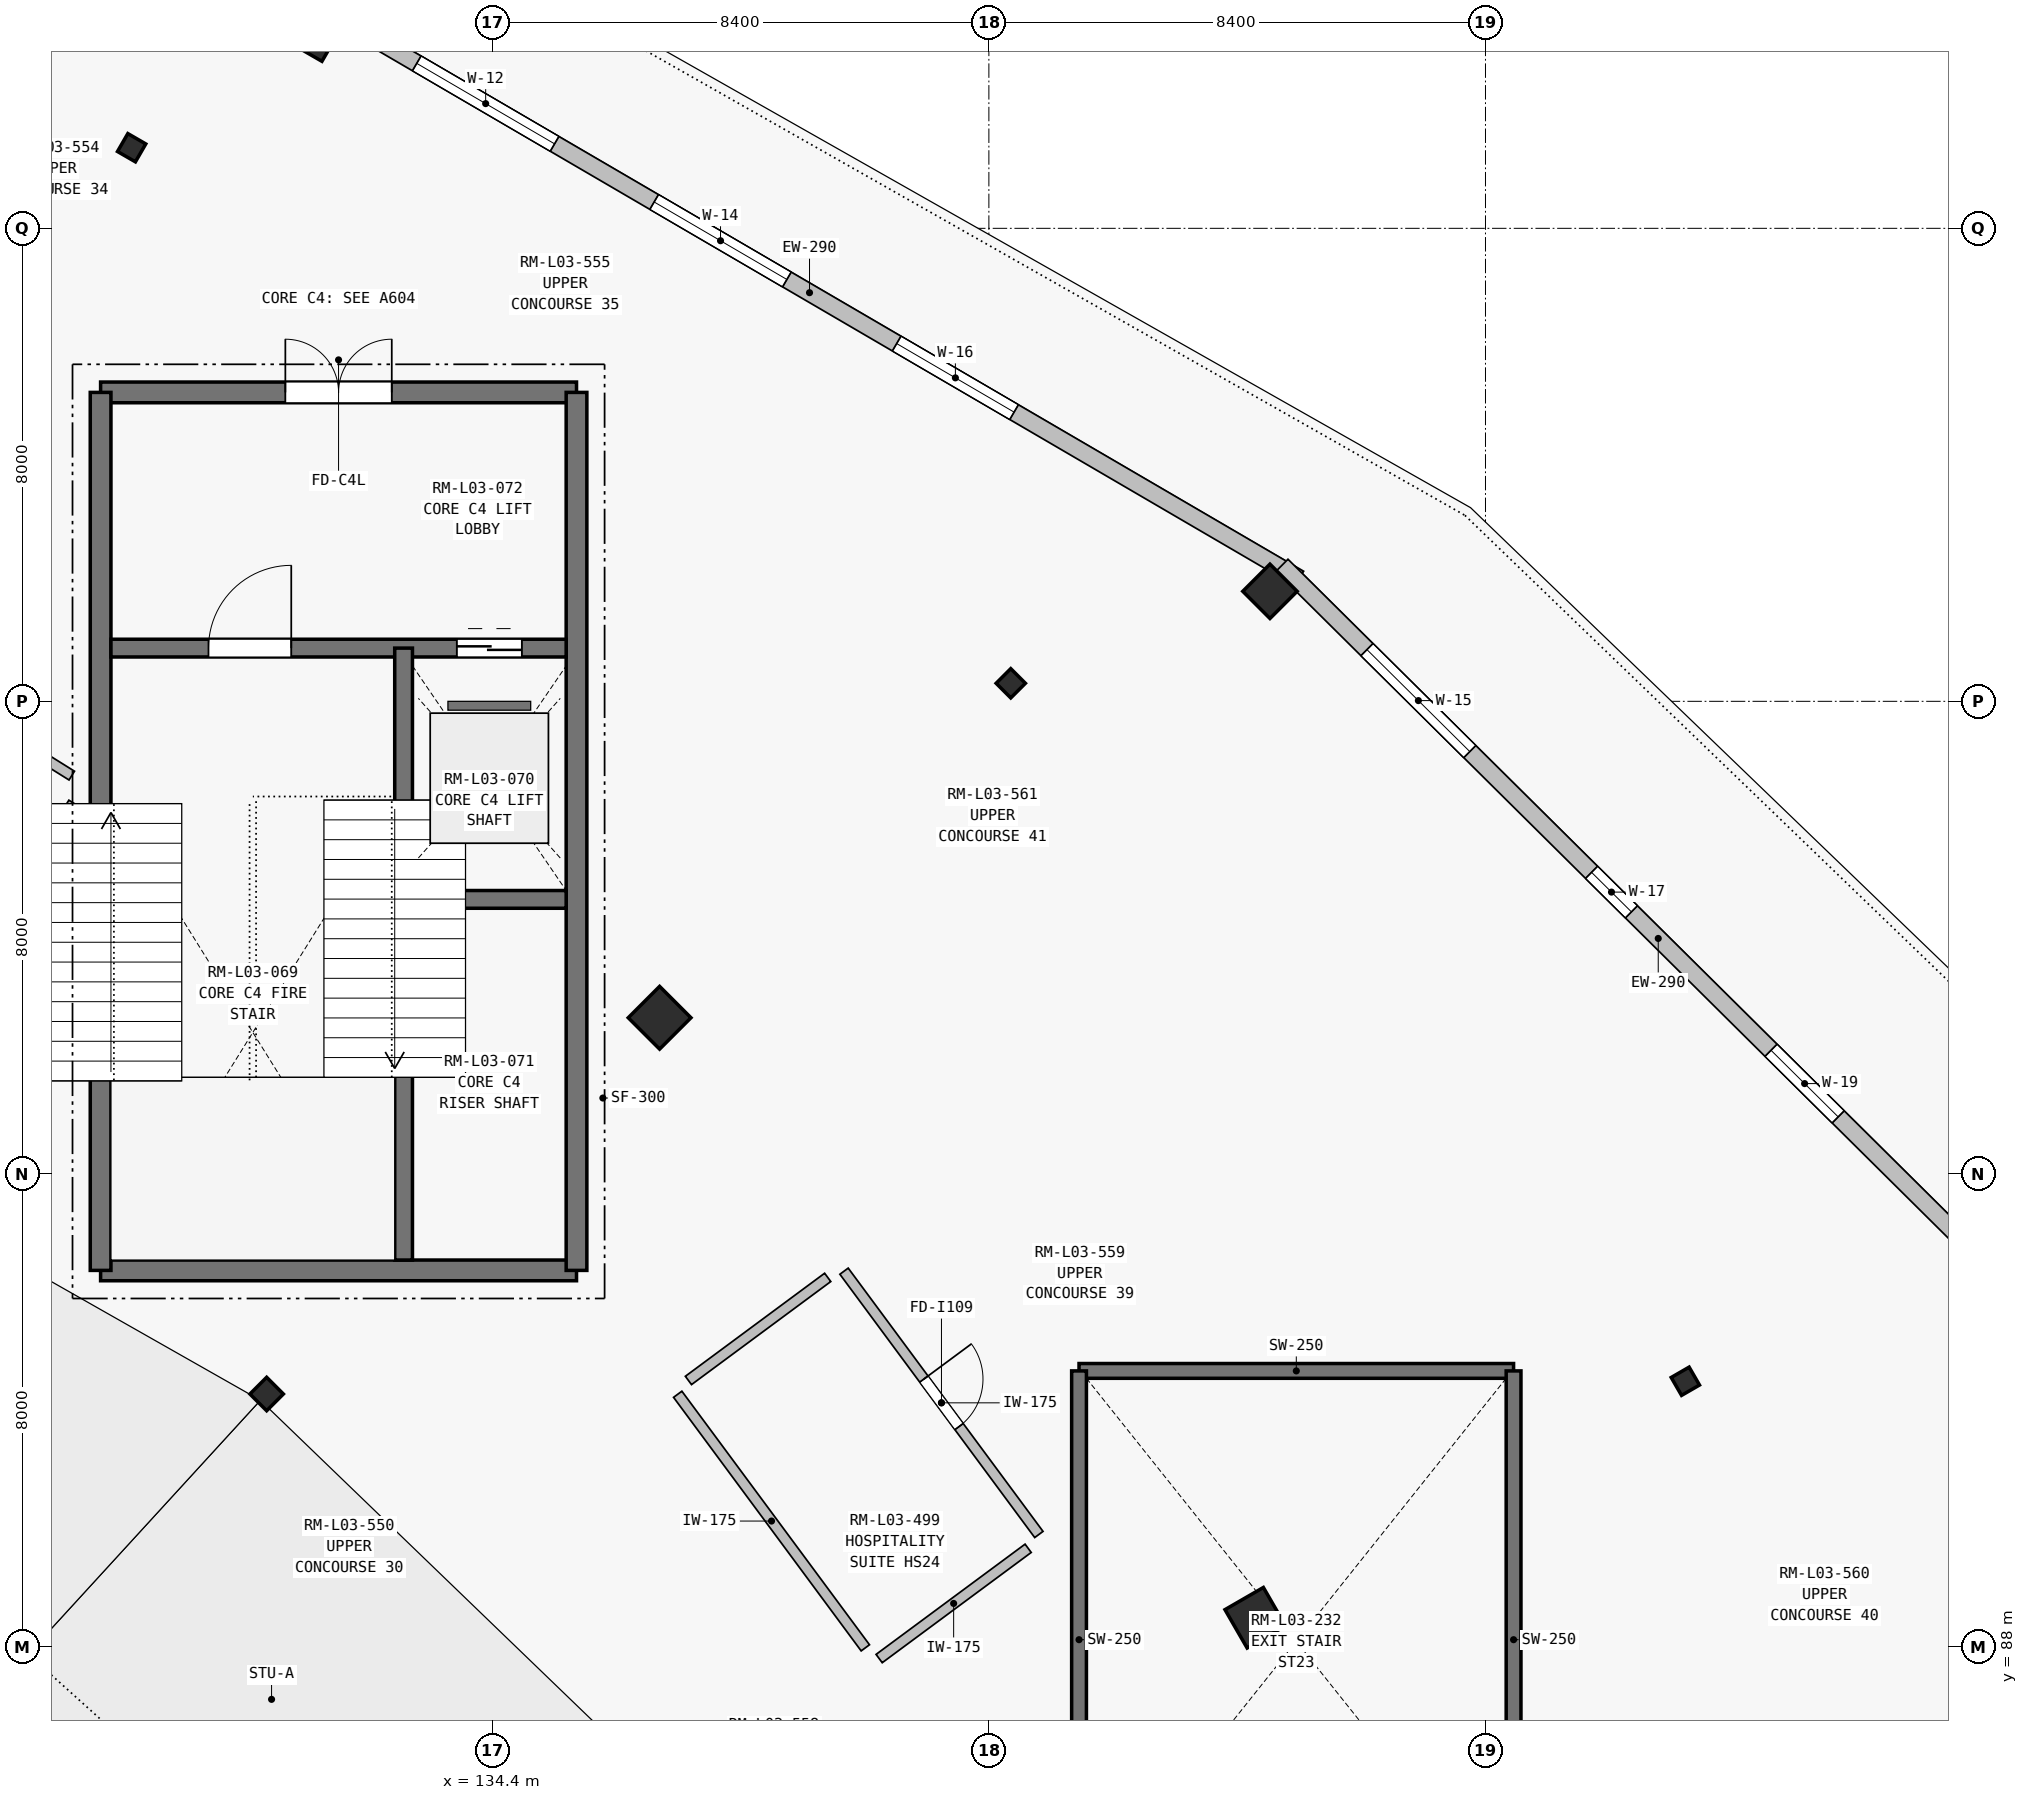
"""IFC4 building model, lengths in metres.
Left out: names, types, materials, properties, quantities, classifications, styles, units other than length and angle.
Written with IfcOpenShell. Run it as: python <this file> out.ifc"""

import sys

from ifc_helpers import new_model, si_unit, direction, frame, frame_2d, origin, origin_2d, place, context, subcontext, project, spatial, rectangle, i_section, extrude, element, fill, save


model = new_model("IFC4")
c1 = context("Model", 3, precision=1e-05, world=origin(), true_north=direction((0.0, 1.0)))
c2 = subcontext(c1, "Body", "Model", "MODEL_VIEW")
j1 = project(units=[si_unit("LENGTHUNIT", "METRE"), si_unit("PLANEANGLEUNIT", "RADIAN")], contexts=[c1])
p1 = place(None, origin())
s1 = spatial("IfcSite", under=j1, at=p1, CompositionType="ELEMENT")
p2 = place(p1, origin())
s2 = spatial("IfcBuilding", under=s1, at=p2, CompositionType="ELEMENT")
p3 = place(p2, frame((0.0, 0.0, 14.4)))
s3 = spatial("IfcBuildingStorey", under=s2, at=p3, CompositionType="ELEMENT", Elevation=14.4)
p4 = place(p3, frame((130.584, 92.284, 0.0), z_axis=(0.0, 0.0, 1.0), x_axis=(0.707106781187, 0.707106781187, 0.0)))
e1 = element("IfcColumn", 1, at=p4, inside=s3, PredefinedType="COLUMN", context=c2, shape_type="SweptSolid", body=[
    extrude(i_section(OverallWidth=0.4, OverallDepth=0.4, WebThickness=0.016, FlangeThickness=0.028, at=origin_2d()), origin(), (0.0, 0.0, 1.0), 4.5),
])
for number, where, z_axis, x_axis in (
    (2, (147.306, 88.5, 0.0), (0.0, 0.0, 1.0), (0.866, 0.5, 0.0)),
    (3, (137.231, 98.648, 0.0), (0.0, 0.0, 1.0), (0.707, 0.707, 0.0)),
):
    element("IfcColumn", number, at=place(p3, frame(where, z_axis=z_axis, x_axis=x_axis)), inside=s3, PredefinedType="COLUMN", context=c2, shape_type="SweptSolid", body=[
        extrude(rectangle(XDim=0.75, YDim=0.75, at=origin_2d()), origin(), (0.0, 0.0, 1.0), 4.5),
    ])
for number, where, z_axis, x_axis in (
    (4, (154.581, 92.5, 0.0), (0.0, 0.0, 1.0), (0.866, 0.5, 0.0)),
    (5, (143.17, 104.305, 0.0), (0.0, 0.0, 1.0), (0.707, 0.707, 0.0)),
    (6, (128.3, 113.363, 0.0), (0.0, 0.0, 1.0), (0.5, 0.866, 0.0)),
):
    element("IfcColumn", number, at=place(p3, frame(where, z_axis=z_axis, x_axis=x_axis)), inside=s3, PredefinedType="COLUMN", context=c2, shape_type="SweptSolid", body=[
        extrude(i_section(OverallWidth=0.35, OverallDepth=0.35, WebThickness=0.014, FlangeThickness=0.024, at=origin_2d()), origin(), (0.0, 0.0, 1.0), 4.5),
    ])
for number, where, z_axis, x_axis in (
    (7, (147.554, 105.861, 0.0), (0.0, 0.0, 1.0), (0.707, 0.707, 0.0)),
    (8, (131.4, 115.269, 0.0), (0.0, 0.0, 1.0), (0.5, 0.866, 0.0)),
):
    element("IfcColumn", number, at=place(p3, frame(where, z_axis=z_axis, x_axis=x_axis)), inside=s3, PredefinedType="COLUMN", context=c2, shape_type="SweptSolid", body=[
        extrude(rectangle(XDim=0.65, YDim=0.65, at=origin_2d()), origin(), (0.0, 0.0, 1.0), 4.26),
    ])
p5 = place(p3, frame((131.482, 115.748, 0.0), z_axis=(0.0, 0.0, 1.0), x_axis=(0.863607623942, -0.504164528572, 0.0)))
e9 = element("IfcWall", 9, at=p5, inside=s3, PredefinedType="SOLIDWALL", context=c2, shape_type="SweptSolid", body=[
    extrude(rectangle(XDim=19.186, YDim=0.29, at=frame_2d((9.593, 0.0))), origin(), (0.0, 0.0, 1.0), 4.26),
])
p6 = place(p5, frame((1.9, 0.0, 0.9)))
e10 = element("IfcOpeningElement", 10, at=p6, cuts=e9, PredefinedType="OPENING", context=c2, shape_type="SweptSolid", body=[
    extrude(rectangle(XDim=2.7, YDim=1.55, at=frame_2d((1.35, 0.775))), frame((0.0, 0.155, 0.0), z_axis=(0.0, -1.0, 0.0), x_axis=(1.0, 0.0, 0.0)), (0.0, 0.0, 1.0), 0.31),
])
p7 = place(p5, frame((6.55, 0.0, 0.9)))
e11 = element("IfcOpeningElement", 11, at=p7, cuts=e9, PredefinedType="OPENING", context=c2, shape_type="SweptSolid", body=[
    extrude(rectangle(XDim=2.6, YDim=1.4, at=frame_2d((1.3, 0.7))), frame((0.0, 0.155, 0.0), z_axis=(0.0, -1.0, 0.0), x_axis=(1.0, 0.0, 0.0)), (0.0, 0.0, 1.0), 0.31),
])
p8 = place(p5, frame((11.3, 0.0, 0.9)))
e12 = element("IfcOpeningElement", 12, at=p8, cuts=e9, PredefinedType="OPENING", context=c2, shape_type="SweptSolid", body=[
    extrude(rectangle(XDim=2.3, YDim=1.3, at=frame_2d((1.15, 0.65))), frame((0.0, 0.155, 0.0), z_axis=(0.0, -1.0, 0.0), x_axis=(1.0, 0.0, 0.0)), (0.0, 0.0, 1.0), 0.31),
])
p9 = place(p3, frame((147.757, 106.301, 0.0), z_axis=(0.0, 0.0, 1.0), x_axis=(0.710110182589, -0.704090568452, 0.0)))
e13 = element("IfcWall", 13, at=p9, inside=s3, PredefinedType="SOLIDWALL", context=c2, shape_type="SweptSolid", body=[
    extrude(rectangle(XDim=17.927, YDim=0.29, at=frame_2d((8.963, 0.0))), origin(), (0.0, 0.0, 1.0), 4.26),
])
p10 = place(p9, frame((2.025, 0.0, 0.9)))
e14 = element("IfcOpeningElement", 14, at=p10, cuts=e13, PredefinedType="OPENING", context=c2, shape_type="SweptSolid", body=[
    extrude(rectangle(XDim=2.45, YDim=1.35, at=frame_2d((1.225, 0.675))), frame((0.0, 0.155, 0.0), z_axis=(0.0, -1.0, 0.0), x_axis=(1.0, 0.0, 0.0)), (0.0, 0.0, 1.0), 0.31),
])
p11 = place(p9, frame((7.375, 0.0, 0.75)))
e15 = element("IfcOpeningElement", 15, at=p11, cuts=e13, PredefinedType="OPENING", context=c2, shape_type="SweptSolid", body=[
    extrude(rectangle(XDim=0.95, YDim=2.2, at=frame_2d((0.475, 1.1))), frame((0.0, 0.155, 0.0), z_axis=(0.0, -1.0, 0.0), x_axis=(1.0, 0.0, 0.0)), (0.0, 0.0, 1.0), 0.31),
])
p12 = place(p9, frame((11.65, 0.0, 0.9)))
e16 = element("IfcOpeningElement", 16, at=p12, cuts=e13, PredefinedType="OPENING", context=c2, shape_type="SweptSolid", body=[
    extrude(rectangle(XDim=1.6, YDim=1.45, at=frame_2d((0.8, 0.725))), frame((0.0, 0.155, 0.0), z_axis=(0.0, -1.0, 0.0), x_axis=(1.0, 0.0, 0.0)), (0.0, 0.0, 1.0), 0.31),
])
p13 = place(p3, frame((127.775, 94.375, 0.0), z_axis=(0.0, 0.0, 1.0), x_axis=(1.0, 0.0, 0.0)))
e17 = element("IfcWall", 17, at=p13, inside=s3, PredefinedType="SHEAR", context=c2, shape_type="SweptSolid", body=[
    extrude(rectangle(XDim=8.05, YDim=0.35, at=frame_2d((4.025, 0.0))), origin(), (0.0, 0.0, 1.0), 4.5),
])
p14 = place(p3, frame((127.775, 109.225, 0.0), z_axis=(0.0, 0.0, 1.0), x_axis=(1.0, 0.0, 0.0)))
e18 = element("IfcWall", 18, at=p14, inside=s3, PredefinedType="SHEAR", context=c2, shape_type="SweptSolid", body=[
    extrude(rectangle(XDim=8.05, YDim=0.35, at=frame_2d((4.025, 0.0))), origin(), (0.0, 0.0, 1.0), 4.5),
])
p15 = place(p14, frame((3.125, 0.0, 0.0)))
e19 = element("IfcOpeningElement", 19, at=p15, cuts=e18, PredefinedType="OPENING", context=c2, shape_type="SweptSolid", body=[
    extrude(rectangle(XDim=1.8, YDim=2.25, at=frame_2d((0.9, 1.125))), frame((0.0, 0.185, 0.0), z_axis=(0.0, -1.0, 0.0), x_axis=(1.0, 0.0, 0.0)), (0.0, 0.0, 1.0), 0.37),
])
for number, where, z_axis, x_axis in (
    (20, (127.775, 94.375, 0.0), (0.0, 0.0, 1.0), (0.0, 1.0, 0.0)),
    (21, (135.825, 94.375, 0.0), (0.0, 0.0, 1.0), (0.0, 1.0, 0.0)),
):
    element("IfcWall", number, at=place(p3, frame(where, z_axis=z_axis, x_axis=x_axis)), inside=s3, PredefinedType="SHEAR", context=c2, shape_type="SweptSolid", body=[
        extrude(rectangle(XDim=14.85, YDim=0.35, at=frame_2d((7.425, 0.0))), origin(), (0.0, 0.0, 1.0), 4.5),
    ])
p16 = place(p3, frame((127.95, 104.9, 0.0), z_axis=(0.0, 0.0, 1.0), x_axis=(1.0, 0.0, 0.0)))
e22 = element("IfcWall", 22, at=p16, inside=s3, PredefinedType="SHEAR", context=c2, shape_type="SweptSolid", body=[
    extrude(rectangle(XDim=7.7, YDim=0.3, at=frame_2d((3.85, 0.0))), origin(), (0.0, 0.0, 1.0), 4.5),
])
p17 = place(p16, frame((1.65, 0.0, 0.0)))
e23 = element("IfcOpeningElement", 23, at=p17, cuts=e22, PredefinedType="OPENING", context=c2, shape_type="SweptSolid", body=[
    extrude(rectangle(XDim=1.4, YDim=2.2, at=frame_2d((0.7, 1.1))), frame((0.0, 0.16, 0.0), z_axis=(0.0, -1.0, 0.0), x_axis=(1.0, 0.0, 0.0)), (0.0, 0.0, 1.0), 0.32),
])
p18 = place(p16, frame((5.85, 0.0, 0.0)))
e24 = element("IfcOpeningElement", 24, at=p18, cuts=e22, PredefinedType="OPENING", context=c2, shape_type="SweptSolid", body=[
    extrude(rectangle(XDim=1.1, YDim=2.2, at=frame_2d((0.55, 1.1))), frame((0.0, 0.16, 0.0), z_axis=(0.0, -1.0, 0.0), x_axis=(1.0, 0.0, 0.0)), (0.0, 0.0, 1.0), 0.32),
])
p19 = place(p3, frame((132.9, 94.55, 0.0), z_axis=(0.0, 0.0, 1.0), x_axis=(0.0, 1.0, 0.0)))
e25 = element("IfcWall", 25, at=p19, inside=s3, PredefinedType="SHEAR", context=c2, shape_type="SweptSolid", body=[
    extrude(rectangle(XDim=10.35, YDim=0.3, at=frame_2d((5.175, 0.0))), origin(), (0.0, 0.0, 1.0), 4.5),
])
p20 = place(p3, frame((133.05, 100.65, 0.0), z_axis=(0.0, 0.0, 1.0), x_axis=(1.0, 0.0, 0.0)))
e26 = element("IfcWall", 26, at=p20, inside=s3, PredefinedType="SHEAR", context=c2, shape_type="SweptSolid", body=[
    extrude(rectangle(XDim=2.6, YDim=0.3, at=frame_2d((1.3, 0.0))), origin(), (0.0, 0.0, 1.0), 4.5),
])
p21 = place(p3, frame((144.325, 92.675, 0.0), z_axis=(0.0, 0.0, 1.0), x_axis=(1.0, 0.0, 0.0)))
e27 = element("IfcWall", 27, at=p21, inside=s3, PredefinedType="SHEAR", context=c2, shape_type="SweptSolid", body=[
    extrude(rectangle(XDim=7.35, YDim=0.25, at=frame_2d((3.675, 0.0))), origin(), (0.0, 0.0, 1.0), 4.5),
])
for number, where, z_axis, x_axis in (
    (28, (144.325, 79.925, 0.0), (0.0, 0.0, 1.0), (0.0, 1.0, 0.0)),
    (29, (151.675, 79.925, 0.0), (0.0, 0.0, 1.0), (0.0, 1.0, 0.0)),
):
    element("IfcWall", number, at=place(p3, frame(where, z_axis=z_axis, x_axis=x_axis)), inside=s3, PredefinedType="SHEAR", context=c2, shape_type="SweptSolid", body=[
        extrude(rectangle(XDim=12.75, YDim=0.25, at=frame_2d((6.375, 0.0))), origin(), (0.0, 0.0, 1.0), 4.5),
    ])
p22 = place(p3, frame((140.35, 94.362, 0.0), z_axis=(0.0, 0.0, 1.0), x_axis=(0.59480484694, -0.803870135069, 0.0)))
e30 = element("IfcWall", 30, at=p22, inside=s3, PredefinedType="PARTITIONING", context=c2, shape_type="SweptSolid", body=[
    extrude(rectangle(XDim=5.54, YDim=0.175, at=frame_2d((2.77, 0.0))), origin(), (0.0, 0.0, 1.0), 4.2),
])
p23 = place(p22, frame((2.27, 0.0, 0.0)))
e31 = element("IfcOpeningElement", 31, at=p23, cuts=e30, PredefinedType="OPENING", context=c2, shape_type="SweptSolid", body=[
    extrude(rectangle(XDim=1.0, YDim=2.2, at=frame_2d((0.5, 1.1))), frame((0.0, 0.097, 0.0), z_axis=(0.0, -1.0, 0.0), x_axis=(1.0, 0.0, 0.0)), (0.0, 0.0, 1.0), 0.195),
])
p24 = place(p3, frame((143.464, 89.675, 0.0), z_axis=(0.0, 0.0, 1.0), x_axis=(-0.80384264388, -0.594841999089, 0.0)))
e32 = element("IfcWall", 32, at=p24, inside=s3, PredefinedType="PARTITIONING", context=c2, shape_type="SweptSolid", body=[
    extrude(rectangle(XDim=3.135, YDim=0.175, at=frame_2d((1.568, 0.0))), origin(), (0.0, 0.0, 1.0), 3.871),
])
p25 = place(p3, frame((140.71, 87.991, 0.0), z_axis=(0.0, 0.0, 1.0), x_axis=(-0.594818166461, 0.803860279432, 0.0)))
e33 = element("IfcWall", 33, at=p25, inside=s3, PredefinedType="PARTITIONING", context=c2, shape_type="SweptSolid", body=[
    extrude(rectangle(XDim=5.335, YDim=0.175, at=frame_2d((2.667, 0.0))), origin(), (0.0, 0.0, 1.0), 3.871),
])
p26 = place(p3, frame((137.718, 92.514, 0.0), z_axis=(0.0, 0.0, 1.0), x_axis=(0.803892091172, 0.59477517244, 0.0)))
e34 = element("IfcWall", 34, at=p26, inside=s3, PredefinedType="PARTITIONING", context=c2, shape_type="SweptSolid", body=[
    extrude(rectangle(XDim=2.93, YDim=0.175, at=frame_2d((1.465, 0.0))), origin(), (0.0, 0.0, 1.0), 4.2),
])
p27 = place(p3, frame((127.312, 102.282, 0.0), z_axis=(0.0, 0.0, 1.0), x_axis=(-0.529861863613, -0.848083961344, 0.0)))
e35 = element("IfcWall", 35, at=p27, inside=s3, PredefinedType="PARTITIONING", context=c2, shape_type="SweptSolid", body=[
    extrude(rectangle(XDim=3.042, YDim=0.175, at=frame_2d((1.521, 0.0))), origin(), (0.0, 0.0, 1.0), 4.2),
])
p28 = place(p3, frame((124.563, 104.446, 0.0), z_axis=(0.0, 0.0, 1.0), x_axis=(0.848045264823, -0.529923795287, 0.0)))
e36 = element("IfcWall", 36, at=p28, inside=s3, PredefinedType="PARTITIONING", context=c2, shape_type="SweptSolid", body=[
    extrude(rectangle(XDim=3.212, YDim=0.175, at=frame_2d((1.606, 0.0))), origin(), (0.0, 0.0, 1.0), 4.2),
])
p29 = place(p28, frame((1.081, 0.0, 0.0)))
e37 = element("IfcOpeningElement", 37, at=p29, cuts=e36, PredefinedType="OPENING", context=c2, shape_type="SweptSolid", body=[
    extrude(rectangle(XDim=1.05, YDim=2.25, at=frame_2d((0.525, 1.125))), frame((0.0, 0.097, 0.0), z_axis=(0.0, -1.0, 0.0), x_axis=(1.0, 0.0, 0.0)), (0.0, 0.0, 1.0), 0.195),
])
p30 = place(p6, origin())
e38 = element("IfcWindow", 38, at=p30, inside=s3, PartitioningType="SINGLE_PANEL", PredefinedType="WINDOW", context=c2, shape_type="SweptSolid", body=[
    extrude(rectangle(XDim=2.7, YDim=1.55, at=frame_2d((1.35, 0.775))), frame((0.0, 0.03, 0.0), z_axis=(0.0, -1.0, 0.0), x_axis=(1.0, 0.0, 0.0)), (0.0, 0.0, 1.0), 0.06),
])
fill(e10, e38)
p31 = place(p7, origin())
e39 = element("IfcWindow", 39, at=p31, inside=s3, PartitioningType="SINGLE_PANEL", PredefinedType="WINDOW", context=c2, shape_type="SweptSolid", body=[
    extrude(rectangle(XDim=2.6, YDim=1.4, at=frame_2d((1.3, 0.7))), frame((0.0, 0.03, 0.0), z_axis=(0.0, -1.0, 0.0), x_axis=(1.0, 0.0, 0.0)), (0.0, 0.0, 1.0), 0.06),
])
fill(e11, e39)
p32 = place(p8, origin())
e40 = element("IfcWindow", 40, at=p32, inside=s3, PartitioningType="SINGLE_PANEL", PredefinedType="WINDOW", context=c2, shape_type="SweptSolid", body=[
    extrude(rectangle(XDim=2.3, YDim=1.3, at=frame_2d((1.15, 0.65))), frame((0.0, 0.03, 0.0), z_axis=(0.0, -1.0, 0.0), x_axis=(1.0, 0.0, 0.0)), (0.0, 0.0, 1.0), 0.06),
])
fill(e12, e40)
p33 = place(p10, origin())
e41 = element("IfcWindow", 41, at=p33, inside=s3, PartitioningType="SINGLE_PANEL", PredefinedType="WINDOW", context=c2, shape_type="SweptSolid", body=[
    extrude(rectangle(XDim=2.45, YDim=1.35, at=frame_2d((1.225, 0.675))), frame((0.0, 0.03, 0.0), z_axis=(0.0, -1.0, 0.0), x_axis=(1.0, 0.0, 0.0)), (0.0, 0.0, 1.0), 0.06),
])
fill(e14, e41)
p34 = place(p11, origin())
e42 = element("IfcWindow", 42, at=p34, inside=s3, PartitioningType="SINGLE_PANEL", PredefinedType="WINDOW", context=c2, shape_type="SweptSolid", body=[
    extrude(rectangle(XDim=0.95, YDim=2.2, at=frame_2d((0.475, 1.1))), frame((0.0, 0.03, 0.0), z_axis=(0.0, -1.0, 0.0), x_axis=(1.0, 0.0, 0.0)), (0.0, 0.0, 1.0), 0.06),
])
fill(e15, e42)
p35 = place(p12, origin())
e43 = element("IfcWindow", 43, at=p35, inside=s3, PartitioningType="SINGLE_PANEL", PredefinedType="WINDOW", context=c2, shape_type="SweptSolid", body=[
    extrude(rectangle(XDim=1.6, YDim=1.45, at=frame_2d((0.8, 0.725))), frame((0.0, 0.03, 0.0), z_axis=(0.0, -1.0, 0.0), x_axis=(1.0, 0.0, 0.0)), (0.0, 0.0, 1.0), 0.06),
])
fill(e16, e43)
p36 = place(p15, origin())
e44 = element("IfcDoor", 44, at=p36, inside=s3, OperationType="DOUBLE_DOOR_SINGLE_SWING", PredefinedType="DOOR", context=c2, shape_type="SweptSolid", body=[
    extrude(rectangle(XDim=1.8, YDim=2.25, at=frame_2d((0.9, 1.125))), frame((0.0, 0.025, 0.0), z_axis=(0.0, -1.0, 0.0), x_axis=(1.0, 0.0, 0.0)), (0.0, 0.0, 1.0), 0.05),
])
fill(e19, e44)
p37 = place(p17, origin())
e45 = element("IfcDoor", 45, at=p37, inside=s3, OperationType="SINGLE_SWING_RIGHT", PredefinedType="DOOR", context=c2, shape_type="SweptSolid", body=[
    extrude(rectangle(XDim=1.4, YDim=2.2, at=frame_2d((0.7, 1.1))), frame((0.0, 0.025, 0.0), z_axis=(0.0, -1.0, 0.0), x_axis=(1.0, 0.0, 0.0)), (0.0, 0.0, 1.0), 0.05),
])
fill(e23, e45)
p38 = place(p18, origin())
e46 = element("IfcDoor", 46, at=p38, inside=s3, OperationType="SLIDING_TO_LEFT", PredefinedType="DOOR", context=c2, shape_type="SweptSolid", body=[
    extrude(rectangle(XDim=1.1, YDim=2.2, at=frame_2d((0.55, 1.1))), frame((0.0, 0.025, 0.0), z_axis=(0.0, -1.0, 0.0), x_axis=(1.0, 0.0, 0.0)), (0.0, 0.0, 1.0), 0.05),
])
fill(e24, e46)
p39 = place(p23, origin())
e47 = element("IfcDoor", 47, at=p39, inside=s3, OperationType="SINGLE_SWING_LEFT", PredefinedType="DOOR", context=c2, shape_type="SweptSolid", body=[
    extrude(rectangle(XDim=1.0, YDim=2.2, at=frame_2d((0.5, 1.1))), frame((0.0, 0.025, 0.0), z_axis=(0.0, -1.0, 0.0), x_axis=(1.0, 0.0, 0.0)), (0.0, 0.0, 1.0), 0.05),
])
fill(e31, e47)
save(model, sys.argv[1])
